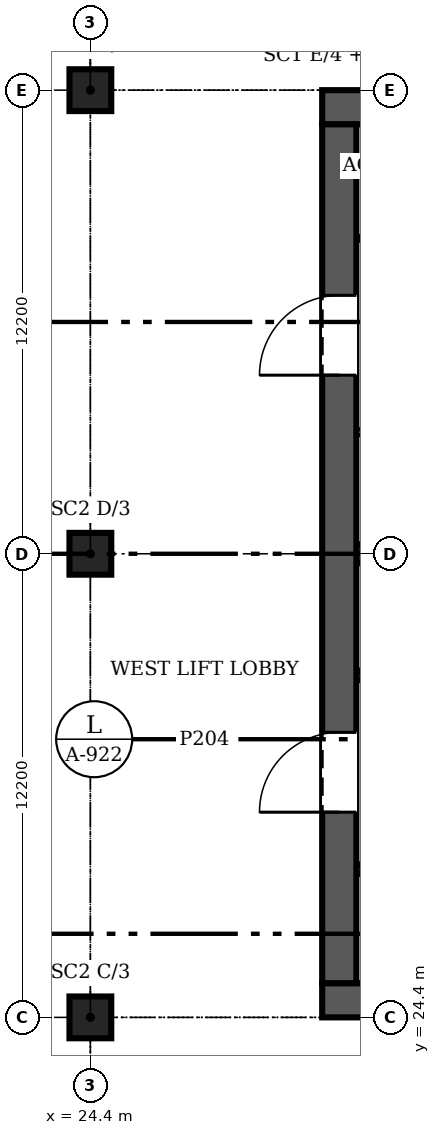
"""IFC4 building model, lengths in metres.
Left out: names, types, materials, properties, quantities, classifications, styles, units other than length and angle.
Written with IfcOpenShell. Run it as: python <this file> out.ifc"""

import sys

from ifc_helpers import new_model, si_unit, direction, frame, frame_2d, origin, origin_2d, place, context, subcontext, project, spatial, rectangle, extrude, source, transform, mapped, element, fill, save


model = new_model("IFC4")
c1 = context("Model", 3, precision=1e-05, world=origin(), true_north=direction((0.0, 1.0)))
c2 = subcontext(c1, "Body", "Model", "MODEL_VIEW")
j1 = project(units=[si_unit("LENGTHUNIT", "METRE"), si_unit("PLANEANGLEUNIT", "RADIAN")], contexts=[c1])
p1 = place(None, origin())
s1 = spatial("IfcSite", under=j1, at=p1, CompositionType="ELEMENT")
p2 = place(p1, origin())
s2 = spatial("IfcBuilding", under=s1, at=p2, CompositionType="ELEMENT")
p3 = place(p2, origin())
s3 = spatial("IfcBuildingStorey", under=s2, at=p3, CompositionType="ELEMENT", Elevation=0.0)
for number, where, z_axis, x_axis in (
    (1, (24.4, 24.4, 0.0), (0.0, 0.0, 1.0), (1.0, 0.0, 0.0)),
    (2, (24.4, 36.6, 0.0), (0.0, 0.0, 1.0), (1.0, 0.0, 0.0)),
    (3, (24.4, 48.8, 0.0), (0.0, 0.0, 1.0), (1.0, 0.0, 0.0)),
):
    element("IfcColumn", number, at=place(p3, frame(where, z_axis=z_axis, x_axis=x_axis)), inside=s3, PredefinedType="COLUMN", context=c2, shape_type="SweptSolid", body=[
        extrude(rectangle(XDim=1.1, YDim=1.1, at=origin_2d()), origin(), (0.0, 0.0, 1.0), 6.95),
    ])
p4 = place(p3, frame((54.9, 24.85, 0.0), z_axis=(0.0, 0.0, 1.0), x_axis=(-1.0, 0.0, 0.0)))
e4 = element("IfcWall", 4, at=p4, inside=s3, PredefinedType="SHEAR", context=c2, shape_type="SweptSolid", body=[
    extrude(rectangle(XDim=24.4, YDim=0.9, at=frame_2d((12.2, 0.0))), origin(), (0.0, 0.0, 1.0), 7.2),
])
p5 = place(p3, frame((30.95, 25.3, 0.0), z_axis=(0.0, 0.0, 1.0), x_axis=(0.0, 1.0, 0.0)))
e5 = element("IfcWall", 5, at=p5, inside=s3, PredefinedType="SHEAR", context=c2, shape_type="SweptSolid", body=[
    extrude(rectangle(XDim=22.6, YDim=0.9, at=frame_2d((11.3, 0.0))), origin(), (0.0, 0.0, 1.0), 7.2),
])
m1 = source(origin(), c2, "Body", "SweptSolid", [
    extrude(rectangle(XDim=2.1, YDim=2.4, at=frame_2d((1.05, 1.2))), frame((0.0, 0.46, 0.0), z_axis=(0.0, -1.0, 0.0), x_axis=(1.0, 0.0, 0.0)), (0.0, 0.0, 1.0), 0.92),
])
p6 = place(p5, frame((4.5, 0.0, 0.0)))
e6 = element("IfcOpeningElement", 6, at=p6, cuts=e5, PredefinedType="OPENING", context=c2, shape_type="MappedRepresentation", body=[
    mapped(m1, transform((0.0, 0.0, 0.0), scale=1.0)),
])
p7 = place(p5, frame((16.0, 0.0, 0.0)))
e7 = element("IfcOpeningElement", 7, at=p7, cuts=e5, PredefinedType="OPENING", context=c2, shape_type="MappedRepresentation", body=[
    mapped(m1, transform((0.0, 0.0, 0.0), scale=1.0)),
])
p8 = place(p3, frame((30.5, 48.35, 0.0), z_axis=(0.0, 0.0, 1.0), x_axis=(1.0, 0.0, 0.0)))
e8 = element("IfcWall", 8, at=p8, inside=s3, PredefinedType="SHEAR", context=c2, shape_type="SweptSolid", body=[
    extrude(rectangle(XDim=24.4, YDim=0.9, at=frame_2d((12.2, 0.0))), origin(), (0.0, 0.0, 1.0), 7.2),
])
p9 = place(p3, frame((31.4, 36.6, 0.0), z_axis=(0.0, 0.0, 1.0), x_axis=(1.0, 0.0, 0.0)))
e9 = element("IfcWall", 9, at=p9, inside=s3, PredefinedType="SHEAR", context=c2, shape_type="SweptSolid", body=[
    extrude(rectangle(XDim=16.95, YDim=0.5, at=frame_2d((8.475, 0.0))), origin(), (0.0, 0.0, 1.0), 7.2),
])
p10 = place(p3, frame((42.45, 33.4, 0.0), z_axis=(0.0, 0.0, 1.0), x_axis=(-1.0, 0.0, 0.0)))
e10 = element("IfcWall", 10, at=p10, inside=s3, PredefinedType="SOLIDWALL", context=c2, shape_type="SweptSolid", body=[
    extrude(rectangle(XDim=11.05, YDim=0.25, at=frame_2d((5.525, 0.0))), origin(), (0.0, 0.0, 1.0), 7.2),
])
m2 = source(origin(), c2, "Body", "SweptSolid", [
    extrude(rectangle(XDim=1.1, YDim=2.1, at=frame_2d((0.55, 1.05))), frame((0.0, 0.135, 0.0), z_axis=(0.0, -1.0, 0.0), x_axis=(1.0, 0.0, 0.0)), (0.0, 0.0, 1.0), 0.27),
])
p11 = place(p10, frame((9.087, 0.0, 0.0)))
e11 = element("IfcOpeningElement", 11, at=p11, cuts=e10, PredefinedType="OPENING", context=c2, shape_type="MappedRepresentation", body=[
    mapped(m2, transform((0.0, 0.0, 0.0), scale=1.0)),
])
p12 = place(p10, frame((6.262, 0.0, 0.0)))
e12 = element("IfcOpeningElement", 12, at=p12, cuts=e10, PredefinedType="OPENING", context=c2, shape_type="MappedRepresentation", body=[
    mapped(m2, transform((0.0, 0.0, 0.0), scale=1.0)),
])
p13 = place(p10, frame((3.438, 0.0, 0.0)))
e13 = element("IfcOpeningElement", 13, at=p13, cuts=e10, PredefinedType="OPENING", context=c2, shape_type="MappedRepresentation", body=[
    mapped(m2, transform((0.0, 0.0, 0.0), scale=1.0)),
])
p14 = place(p10, frame((0.613, 0.0, 0.0)))
e14 = element("IfcOpeningElement", 14, at=p14, cuts=e10, PredefinedType="OPENING", context=c2, shape_type="MappedRepresentation", body=[
    mapped(m2, transform((0.0, 0.0, 0.0), scale=1.0)),
])
p15 = place(p3, frame((31.4, 28.3, 0.0), z_axis=(0.0, 0.0, 1.0), x_axis=(1.0, 0.0, 0.0)))
e15 = element("IfcWall", 15, at=p15, inside=s3, PredefinedType="SOLIDWALL", context=c2, shape_type="SweptSolid", body=[
    extrude(rectangle(XDim=11.05, YDim=0.25, at=frame_2d((5.525, 0.0))), origin(), (0.0, 0.0, 1.0), 7.2),
])
p16 = place(p15, frame((0.863, 0.0, 0.0)))
e16 = element("IfcOpeningElement", 16, at=p16, cuts=e15, PredefinedType="OPENING", context=c2, shape_type="MappedRepresentation", body=[
    mapped(m2, transform((0.0, 0.0, 0.0), scale=1.0)),
])
p17 = place(p15, frame((3.688, 0.0, 0.0)))
e17 = element("IfcOpeningElement", 17, at=p17, cuts=e15, PredefinedType="OPENING", context=c2, shape_type="MappedRepresentation", body=[
    mapped(m2, transform((0.0, 0.0, 0.0), scale=1.0)),
])
p18 = place(p15, frame((6.512, 0.0, 0.0)))
e18 = element("IfcOpeningElement", 18, at=p18, cuts=e15, PredefinedType="OPENING", context=c2, shape_type="MappedRepresentation", body=[
    mapped(m2, transform((0.0, 0.0, 0.0), scale=1.0)),
])
p19 = place(p15, frame((9.337, 0.0, 0.0)))
e19 = element("IfcOpeningElement", 19, at=p19, cuts=e15, PredefinedType="OPENING", context=c2, shape_type="MappedRepresentation", body=[
    mapped(m2, transform((0.0, 0.0, 0.0), scale=1.0)),
])
p20 = place(p3, frame((31.4, 44.9, 0.0), z_axis=(0.0, 0.0, 1.0), x_axis=(1.0, 0.0, 0.0)))
e20 = element("IfcWall", 20, at=p20, inside=s3, PredefinedType="PARTITIONING", context=c2, shape_type="SweptSolid", body=[
    extrude(rectangle(XDim=11.05, YDim=0.12, at=frame_2d((5.525, 0.0))), origin(), (0.0, 0.0, 1.0), 6.95),
])
m3 = source(origin(), c2, "Body", "SweptSolid", [
    extrude(rectangle(XDim=0.9, YDim=2.1, at=frame_2d((0.45, 1.05))), frame((0.0, 0.07, 0.0), z_axis=(0.0, -1.0, 0.0), x_axis=(1.0, 0.0, 0.0)), (0.0, 0.0, 1.0), 0.14),
])
p21 = place(p20, frame((0.962, 0.0, 0.0)))
e21 = element("IfcOpeningElement", 21, at=p21, cuts=e20, PredefinedType="OPENING", context=c2, shape_type="MappedRepresentation", body=[
    mapped(m3, transform((0.0, 0.0, 0.0), scale=1.0)),
])
p22 = place(p20, frame((6.613, 0.0, 0.0)))
e22 = element("IfcOpeningElement", 22, at=p22, cuts=e20, PredefinedType="OPENING", context=c2, shape_type="MappedRepresentation", body=[
    mapped(m3, transform((0.0, 0.0, 0.0), scale=1.0)),
])
p23 = place(p3, frame((38.925, 39.8, 0.0), z_axis=(0.0, 0.0, 1.0), x_axis=(-1.0, 0.0, 0.0)))
e23 = element("IfcWall", 23, at=p23, inside=s3, PredefinedType="PARTITIONING", context=c2, shape_type="SweptSolid", body=[
    extrude(rectangle(XDim=7.525, YDim=0.15, at=frame_2d((3.763, 0.0))), origin(), (0.0, 0.0, 1.0), 6.95),
])
m4 = source(origin(), c2, "Body", "SweptSolid", [
    extrude(rectangle(XDim=0.9, YDim=2.1, at=frame_2d((0.45, 1.05))), frame((0.0, 0.085, 0.0), z_axis=(0.0, -1.0, 0.0), x_axis=(1.0, 0.0, 0.0)), (0.0, 0.0, 1.0), 0.17),
])
p24 = place(p23, frame((5.188, 0.0, 0.0)))
e24 = element("IfcOpeningElement", 24, at=p24, cuts=e23, PredefinedType="OPENING", context=c2, shape_type="MappedRepresentation", body=[
    mapped(m4, transform((0.0, 0.0, 0.0), scale=1.0)),
])
p25 = place(p23, frame((1.425, 0.0, 0.0)))
e25 = element("IfcOpeningElement", 25, at=p25, cuts=e23, PredefinedType="OPENING", context=c2, shape_type="MappedRepresentation", body=[
    mapped(m4, transform((0.0, 0.0, 0.0), scale=1.0)),
])
m5 = source(origin(), c2, "Body", "SweptSolid", [
    extrude(rectangle(XDim=2.1, YDim=2.4, at=frame_2d((1.05, 1.2))), frame((0.0, 0.025, 0.0), z_axis=(0.0, -1.0, 0.0), x_axis=(1.0, 0.0, 0.0)), (0.0, 0.0, 1.0), 0.05),
])
p26 = place(p6, origin())
e26 = element("IfcDoor", 26, at=p26, inside=s3, OperationType="DOUBLE_DOOR_SINGLE_SWING", PredefinedType="DOOR", context=c2, shape_type="MappedRepresentation", body=[
    mapped(m5, transform((0.0, 0.0, 0.0), scale=1.0)),
])
fill(e6, e26)
p27 = place(p7, origin())
e27 = element("IfcDoor", 27, at=p27, inside=s3, OperationType="DOUBLE_DOOR_SINGLE_SWING", PredefinedType="DOOR", context=c2, shape_type="MappedRepresentation", body=[
    mapped(m5, transform((0.0, 0.0, 0.0), scale=1.0)),
])
fill(e7, e27)
save(model, sys.argv[1])
